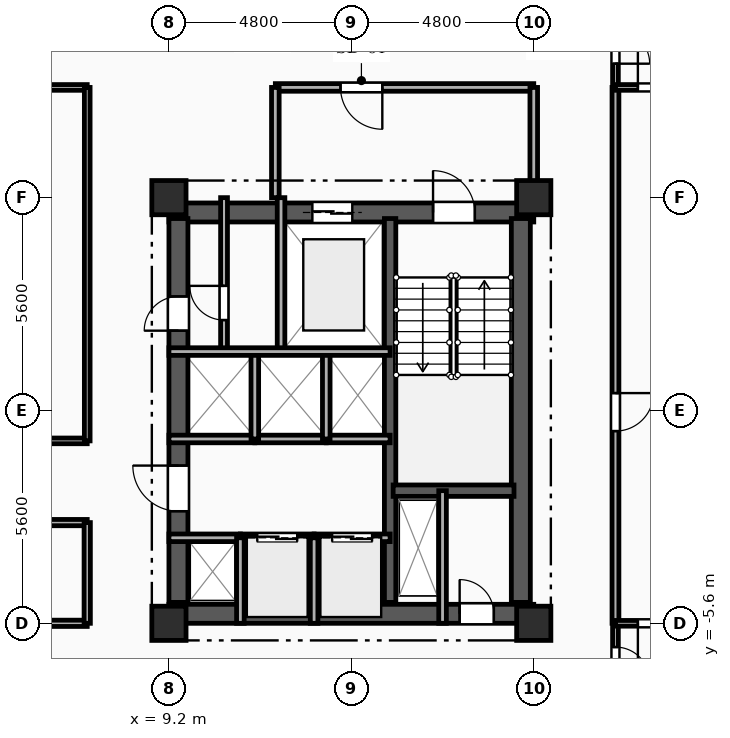
"""IFC4 building model, lengths in metres.
Left out: names, types, materials, properties, quantities, classifications, styles, units other than length and angle.
Written with IfcOpenShell. Run it as: python <this file> out.ifc"""

import sys

from ifc_helpers import new_model, si_unit, direction, frame, frame_2d, origin, origin_2d, place, context, subcontext, project, spatial, rectangle, extrude, element, fill, save


model = new_model("IFC4")
c1 = context("Model", 3, precision=1e-05, world=origin(), true_north=direction((0.0, 1.0)))
c2 = subcontext(c1, "Body", "Model", "MODEL_VIEW")
j1 = project(units=[si_unit("LENGTHUNIT", "METRE"), si_unit("PLANEANGLEUNIT", "RADIAN")], contexts=[c1])
p1 = place(None, origin())
s1 = spatial("IfcSite", under=j1, at=p1, CompositionType="ELEMENT")
p2 = place(p1, origin())
s2 = spatial("IfcBuilding", under=s1, at=p2, CompositionType="ELEMENT")
p3 = place(p2, frame((0.0, 0.0, 161.15)))
s3 = spatial("IfcBuildingStorey", under=s2, at=p3, CompositionType="ELEMENT", Elevation=161.15)
for number, where, z_axis, x_axis in (
    (1, (9.2, -5.6, 0.0), (0.0, 0.0, 1.0), (1.0, 0.0, 0.0)),
    (2, (9.2, 5.6, 0.0), (0.0, 0.0, 1.0), (1.0, 0.0, 0.0)),
    (3, (18.8, -5.6, 0.0), (0.0, 0.0, 1.0), (1.0, 0.0, 0.0)),
    (4, (18.8, 5.6, 0.0), (0.0, 0.0, 1.0), (1.0, 0.0, 0.0)),
):
    element("IfcColumn", number, at=place(p3, frame(where, z_axis=z_axis, x_axis=x_axis)), inside=s3, PredefinedType="COLUMN", context=c2, shape_type="SweptSolid", body=[
        extrude(rectangle(XDim=0.9, YDim=0.9, at=origin_2d()), origin(), (0.0, 0.0, 1.0), 3.35),
    ])
p4 = place(p3, frame((9.2, 5.21, 0.0), z_axis=(0.0, 0.0, 1.0), x_axis=(1.0, 0.0, 0.0)))
e5 = element("IfcWall", 5, at=p4, inside=s3, PredefinedType="SHEAR", context=c2, shape_type="SweptSolid", body=[
    extrude(rectangle(XDim=9.6, YDim=0.5, at=frame_2d((4.8, 0.0))), origin(), (0.0, 0.0, 1.0), 3.04),
])
p5 = place(p4, frame((6.95, 0.0, 0.0)))
e6 = element("IfcOpeningElement", 6, at=p5, cuts=e5, PredefinedType="OPENING", context=c2, shape_type="SweptSolid", body=[
    extrude(rectangle(XDim=1.1, YDim=2.15, at=frame_2d((0.55, 1.075))), frame((0.0, 0.26, 0.0), z_axis=(0.0, -1.0, 0.0), x_axis=(1.0, 0.0, 0.0)), (0.0, 0.0, 1.0), 0.52),
])
p6 = place(p4, frame((3.775, 0.0, 0.0)))
e7 = element("IfcOpeningElement", 7, at=p6, cuts=e5, PredefinedType="OPENING", context=c2, shape_type="SweptSolid", body=[
    extrude(rectangle(XDim=1.05, YDim=2.1, at=frame_2d((0.525, 1.05))), frame((0.0, 0.26, 0.0), z_axis=(0.0, -1.0, 0.0), x_axis=(1.0, 0.0, 0.0)), (0.0, 0.0, 1.0), 0.52),
])
p7 = place(p3, frame((9.2, -5.35, 0.0), z_axis=(0.0, 0.0, 1.0), x_axis=(1.0, 0.0, 0.0)))
e8 = element("IfcWall", 8, at=p7, inside=s3, PredefinedType="SHEAR", context=c2, shape_type="SweptSolid", body=[
    extrude(rectangle(XDim=9.6, YDim=0.5, at=frame_2d((4.8, 0.0))), origin(), (0.0, 0.0, 1.0), 3.04),
])
p8 = place(p7, frame((7.65, 0.0, 0.0)))
e9 = element("IfcOpeningElement", 9, at=p8, cuts=e8, PredefinedType="OPENING", context=c2, shape_type="SweptSolid", body=[
    extrude(rectangle(XDim=0.9, YDim=2.1, at=frame_2d((0.45, 1.05))), frame((0.0, 0.26, 0.0), z_axis=(0.0, -1.0, 0.0), x_axis=(1.0, 0.0, 0.0)), (0.0, 0.0, 1.0), 0.52),
])
p9 = place(p3, frame((9.45, -5.05, 0.0), z_axis=(0.0, 0.0, 1.0), x_axis=(0.0, 1.0, 0.0)))
e10 = element("IfcWall", 10, at=p9, inside=s3, PredefinedType="SHEAR", context=c2, shape_type="SweptSolid", body=[
    extrude(rectangle(XDim=10.1, YDim=0.5, at=frame_2d((5.05, 0.0))), origin(), (0.0, 0.0, 1.0), 3.04),
])
p10 = place(p9, frame((7.15, 0.0, 0.0)))
e11 = element("IfcOpeningElement", 11, at=p10, cuts=e10, PredefinedType="OPENING", context=c2, shape_type="SweptSolid", body=[
    extrude(rectangle(XDim=0.9, YDim=2.1, at=frame_2d((0.45, 1.05))), frame((0.0, 0.26, 0.0), z_axis=(0.0, -1.0, 0.0), x_axis=(1.0, 0.0, 0.0)), (0.0, 0.0, 1.0), 0.52),
])
p11 = place(p9, frame((2.4, 0.0, 0.0)))
e12 = element("IfcOpeningElement", 12, at=p11, cuts=e10, PredefinedType="OPENING", context=c2, shape_type="SweptSolid", body=[
    extrude(rectangle(XDim=1.2, YDim=2.15, at=frame_2d((0.6, 1.075))), frame((0.0, 0.26, 0.0), z_axis=(0.0, -1.0, 0.0), x_axis=(1.0, 0.0, 0.0)), (0.0, 0.0, 1.0), 0.52),
])
p12 = place(p3, frame((18.46, -5.05, 0.0), z_axis=(0.0, 0.0, 1.0), x_axis=(0.0, 1.0, 0.0)))
e13 = element("IfcWall", 13, at=p12, inside=s3, PredefinedType="SHEAR", context=c2, shape_type="SweptSolid", body=[
    extrude(rectangle(XDim=10.1, YDim=0.5, at=frame_2d((5.05, 0.0))), origin(), (0.0, 0.0, 1.0), 3.04),
])
p13 = place(p3, frame((15.02, -5.05, 0.0), z_axis=(0.0, 0.0, 1.0), x_axis=(0.0, 1.0, 0.0)))
e14 = element("IfcWall", 14, at=p13, inside=s3, PredefinedType="SHEAR", context=c2, shape_type="SweptSolid", body=[
    extrude(rectangle(XDim=10.1, YDim=0.3, at=frame_2d((5.05, 0.0))), origin(), (0.0, 0.0, 1.0), 3.04),
])
p14 = place(p3, frame((15.1, -2.11, 0.0), z_axis=(0.0, 0.0, 1.0), x_axis=(1.0, 0.0, 0.0)))
e15 = element("IfcWall", 15, at=p14, inside=s3, PredefinedType="SHEAR", context=c2, shape_type="SweptSolid", body=[
    extrude(rectangle(XDim=3.18, YDim=0.3, at=frame_2d((1.59, 0.0))), origin(), (0.0, 0.0, 1.0), 3.04),
])
p15 = place(p3, frame((16.4, -2.11, 0.0), z_axis=(0.0, 0.0, 1.0), x_axis=(0.0, -1.0, 0.0)))
e16 = element("IfcWall", 16, at=p15, inside=s3, PredefinedType="PARTITIONING", context=c2, shape_type="SweptSolid", body=[
    extrude(rectangle(XDim=3.49, YDim=0.2, at=frame_2d((1.745, 0.0))), origin(), (0.0, 0.0, 1.0), 3.04),
])
p16 = place(p3, frame((12.15, 5.6, 0.0), z_axis=(0.0, 0.0, 1.0), x_axis=(0.0, -1.0, 0.0)))
e17 = element("IfcWall", 17, at=p16, inside=s3, PredefinedType="PARTITIONING", context=c2, shape_type="SweptSolid", body=[
    extrude(rectangle(XDim=4.05, YDim=0.2, at=frame_2d((2.025, 0.0))), origin(), (0.0, 0.0, 1.0), 3.04),
])
p17 = place(p3, frame((18.8, 8.5, 0.0), z_axis=(0.0, 0.0, 1.0), x_axis=(-1.0, 0.0, 0.0)))
e18 = element("IfcWall", 18, at=p17, inside=s3, PredefinedType="PARTITIONING", context=c2, shape_type="SweptSolid", body=[
    extrude(rectangle(XDim=6.8, YDim=0.2, at=frame_2d((3.4, 0.0))), origin(), (0.0, 0.0, 1.0), 3.04),
])
p18 = place(p17, frame((3.985, 0.0, 0.0)))
e19 = element("IfcOpeningElement", 19, at=p18, cuts=e18, PredefinedType="OPENING", context=c2, shape_type="SweptSolid", body=[
    extrude(rectangle(XDim=1.1, YDim=2.15, at=frame_2d((0.55, 1.075))), frame((0.0, 0.11, 0.0), z_axis=(0.0, -1.0, 0.0), x_axis=(1.0, 0.0, 0.0)), (0.0, 0.0, 1.0), 0.22),
])
p19 = place(p3, frame((18.8, 5.6, 0.0), z_axis=(0.0, 0.0, 1.0), x_axis=(0.0, 1.0, 0.0)))
e20 = element("IfcWall", 20, at=p19, inside=s3, PredefinedType="PARTITIONING", context=c2, shape_type="SweptSolid", body=[
    extrude(rectangle(XDim=2.9, YDim=0.2, at=frame_2d((1.45, 0.0))), origin(), (0.0, 0.0, 1.0), 2.525),
])
p20 = place(p3, frame((12.0, 8.5, 0.0), z_axis=(0.0, 0.0, 1.0), x_axis=(0.0, -1.0, 0.0)))
e21 = element("IfcWall", 21, at=p20, inside=s3, PredefinedType="PARTITIONING", context=c2, shape_type="SweptSolid", body=[
    extrude(rectangle(XDim=2.9, YDim=0.2, at=frame_2d((1.45, 0.0))), origin(), (0.0, 0.0, 1.0), 3.04),
])
p21 = place(p3, frame((10.65, 1.55, 0.0), z_axis=(0.0, 0.0, 1.0), x_axis=(0.0, 1.0, 0.0)))
e22 = element("IfcWall", 22, at=p21, inside=s3, PredefinedType="PARTITIONING", context=c2, shape_type="SweptSolid", body=[
    extrude(rectangle(XDim=4.05, YDim=0.18, at=frame_2d((2.025, 0.0))), origin(), (0.0, 0.0, 1.0), 3.04),
])
p22 = place(p21, frame((0.829, 0.0, 0.0)))
e23 = element("IfcOpeningElement", 23, at=p22, cuts=e22, PredefinedType="OPENING", context=c2, shape_type="SweptSolid", body=[
    extrude(rectangle(XDim=0.9, YDim=2.1, at=frame_2d((0.45, 1.05))), frame((0.0, 0.1, 0.0), z_axis=(0.0, -1.0, 0.0), x_axis=(1.0, 0.0, 0.0)), (0.0, 0.0, 1.0), 0.2),
])
p23 = place(p3, frame((9.2, -3.35, 0.0), z_axis=(0.0, 0.0, 1.0), x_axis=(1.0, 0.0, 0.0)))
e24 = element("IfcWall", 24, at=p23, inside=s3, PredefinedType="PARTITIONING", context=c2, shape_type="SweptSolid", body=[
    extrude(rectangle(XDim=1.88, YDim=0.2, at=frame_2d((0.94, 0.0))), origin(), (0.0, 0.0, 1.0), 2.755),
])
p24 = place(p3, frame((11.08, -3.35, 0.0), z_axis=(0.0, 0.0, 1.0), x_axis=(1.0, 0.0, 0.0)))
e25 = element("IfcWall", 25, at=p24, inside=s3, PredefinedType="PARTITIONING", context=c2, shape_type="SweptSolid", body=[
    extrude(rectangle(XDim=1.94, YDim=0.2, at=frame_2d((0.97, 0.0))), origin(), (0.0, 0.0, 1.0), 3.04),
])
p25 = place(p24, frame((0.445, 0.0, 0.0)))
e26 = element("IfcOpeningElement", 26, at=p25, cuts=e25, PredefinedType="OPENING", context=c2, shape_type="SweptSolid", body=[
    extrude(rectangle(XDim=1.05, YDim=2.1, at=frame_2d((0.525, 1.05))), frame((0.0, 0.11, 0.0), z_axis=(0.0, -1.0, 0.0), x_axis=(1.0, 0.0, 0.0)), (0.0, 0.0, 1.0), 0.22),
])
p26 = place(p3, frame((13.02, -3.35, 0.0), z_axis=(0.0, 0.0, 1.0), x_axis=(1.0, 0.0, 0.0)))
e27 = element("IfcWall", 27, at=p26, inside=s3, PredefinedType="PARTITIONING", context=c2, shape_type="SweptSolid", body=[
    extrude(rectangle(XDim=2.0, YDim=0.2, at=frame_2d((1.0, 0.0))), origin(), (0.0, 0.0, 1.0), 3.04),
])
p27 = place(p26, frame((0.475, 0.0, 0.0)))
e28 = element("IfcOpeningElement", 28, at=p27, cuts=e27, PredefinedType="OPENING", context=c2, shape_type="SweptSolid", body=[
    extrude(rectangle(XDim=1.05, YDim=2.1, at=frame_2d((0.525, 1.05))), frame((0.0, 0.11, 0.0), z_axis=(0.0, -1.0, 0.0), x_axis=(1.0, 0.0, 0.0)), (0.0, 0.0, 1.0), 0.22),
])
p28 = place(p3, frame((11.46, -0.75, 0.0), z_axis=(0.0, 0.0, 1.0), x_axis=(-1.0, 0.0, 0.0)))
e29 = element("IfcWall", 29, at=p28, inside=s3, PredefinedType="PARTITIONING", context=c2, shape_type="SweptSolid", body=[
    extrude(rectangle(XDim=2.26, YDim=0.2, at=frame_2d((1.13, 0.0))), origin(), (0.0, 0.0, 1.0), 3.04),
])
p29 = place(p3, frame((13.34, -0.75, 0.0), z_axis=(0.0, 0.0, 1.0), x_axis=(-1.0, 0.0, 0.0)))
e30 = element("IfcWall", 30, at=p29, inside=s3, PredefinedType="PARTITIONING", context=c2, shape_type="SweptSolid", body=[
    extrude(rectangle(XDim=1.88, YDim=0.2, at=frame_2d((0.94, 0.0))), origin(), (0.0, 0.0, 1.0), 3.04),
])
p30 = place(p3, frame((15.02, -0.75, 0.0), z_axis=(0.0, 0.0, 1.0), x_axis=(-1.0, 0.0, 0.0)))
e31 = element("IfcWall", 31, at=p30, inside=s3, PredefinedType="PARTITIONING", context=c2, shape_type="SweptSolid", body=[
    extrude(rectangle(XDim=1.68, YDim=0.2, at=frame_2d((0.84, 0.0))), origin(), (0.0, 0.0, 1.0), 3.04),
])
for number, where, z_axis, x_axis in (
    (32, (11.08, -5.6, 0.0), (0.0, 0.0, 1.0), (0.0, 1.0, 0.0)),
    (33, (13.02, -5.6, 0.0), (0.0, 0.0, 1.0), (0.0, 1.0, 0.0)),
):
    element("IfcWall", number, at=place(p3, frame(where, z_axis=z_axis, x_axis=x_axis)), inside=s3, PredefinedType="PARTITIONING", context=c2, shape_type="SweptSolid", body=[
        extrude(rectangle(XDim=2.25, YDim=0.2, at=frame_2d((1.125, 0.0))), origin(), (0.0, 0.0, 1.0), 3.04),
    ])
for number, where, z_axis, x_axis in (
    (34, (11.46, -0.75, 0.0), (0.0, 0.0, 1.0), (0.0, 1.0, 0.0)),
    (35, (13.34, -0.75, 0.0), (0.0, 0.0, 1.0), (0.0, 1.0, 0.0)),
):
    element("IfcWall", number, at=place(p3, frame(where, z_axis=z_axis, x_axis=x_axis)), inside=s3, PredefinedType="PARTITIONING", context=c2, shape_type="SweptSolid", body=[
        extrude(rectangle(XDim=2.3, YDim=0.2, at=frame_2d((1.15, 0.0))), origin(), (0.0, 0.0, 1.0), 3.04),
    ])
p31 = place(p3, frame((20.95, 10.65, 0.0), z_axis=(0.0, 0.0, 1.0), x_axis=(0.0, -1.0, 0.0)))
e36 = element("IfcWall", 36, at=p31, inside=s3, PredefinedType="PARTITIONING", context=c2, shape_type="SweptSolid", body=[
    extrude(rectangle(XDim=2.15, YDim=0.15, at=frame_2d((1.075, 0.0))), origin(), (0.0, 0.0, 1.0), 3.04),
])
p32 = place(p31, frame((0.625, 0.0, 0.0)))
e37 = element("IfcOpeningElement", 37, at=p32, cuts=e36, PredefinedType="OPENING", context=c2, shape_type="SweptSolid", body=[
    extrude(rectangle(XDim=0.9, YDim=2.1, at=frame_2d((0.45, 1.05))), frame((0.0, 0.085, 0.0), z_axis=(0.0, -1.0, 0.0), x_axis=(1.0, 0.0, 0.0)), (0.0, 0.0, 1.0), 0.17),
])
p33 = place(p3, frame((7.05, 8.5, 0.0), z_axis=(0.0, 0.0, 1.0), x_axis=(-1.0, 0.0, 0.0)))
e38 = element("IfcWall", 38, at=p33, inside=s3, PredefinedType="PARTITIONING", context=c2, shape_type="SweptSolid", body=[
    extrude(rectangle(XDim=7.05, YDim=0.15, at=frame_2d((3.525, 0.0))), origin(), (0.0, 0.0, 1.0), 3.04),
])
p34 = place(p3, frame((20.95, -5.6, 0.0), z_axis=(0.0, 0.0, 1.0), x_axis=(0.0, -1.0, 0.0)))
e39 = element("IfcWall", 39, at=p34, inside=s3, PredefinedType="PARTITIONING", context=c2, shape_type="SweptSolid", body=[
    extrude(rectangle(XDim=2.15, YDim=0.15, at=frame_2d((1.075, 0.0))), origin(), (0.0, 0.0, 1.0), 3.04),
])
p35 = place(p34, frame((0.625, 0.0, 0.0)))
e40 = element("IfcOpeningElement", 40, at=p35, cuts=e39, PredefinedType="OPENING", context=c2, shape_type="SweptSolid", body=[
    extrude(rectangle(XDim=0.9, YDim=2.1, at=frame_2d((0.45, 1.05))), frame((0.0, 0.085, 0.0), z_axis=(0.0, -1.0, 0.0), x_axis=(1.0, 0.0, 0.0)), (0.0, 0.0, 1.0), 0.17),
])
p36 = place(p3, frame((0.0, -5.6, 0.0), z_axis=(0.0, 0.0, 1.0), x_axis=(1.0, 0.0, 0.0)))
e41 = element("IfcWall", 41, at=p36, inside=s3, PredefinedType="PARTITIONING", context=c2, shape_type="SweptSolid", body=[
    extrude(rectangle(XDim=7.05, YDim=0.165, at=frame_2d((3.525, 0.0))), origin(), (0.0, 0.0, 1.0), 2.525),
])
p37 = place(p3, frame((20.95, 8.5, 0.0), z_axis=(0.0, 0.0, 1.0), x_axis=(0.0, -1.0, 0.0)))
e42 = element("IfcWall", 42, at=p37, inside=s3, PredefinedType="PARTITIONING", context=c2, shape_type="SweptSolid", body=[
    extrude(rectangle(XDim=14.1, YDim=0.18, at=frame_2d((7.05, 0.0))), origin(), (0.0, 0.0, 1.0), 3.04),
])
p38 = place(p37, frame((8.042, 0.0, 0.0)))
e43 = element("IfcOpeningElement", 43, at=p38, cuts=e42, PredefinedType="OPENING", context=c2, shape_type="SweptSolid", body=[
    extrude(rectangle(XDim=1.0, YDim=2.15, at=frame_2d((0.5, 1.075))), frame((0.0, 0.1, 0.0), z_axis=(0.0, -1.0, 0.0), x_axis=(1.0, 0.0, 0.0)), (0.0, 0.0, 1.0), 0.2),
])
p39 = place(p3, frame((-7.05, -0.8, 0.0), z_axis=(0.0, 0.0, 1.0), x_axis=(1.0, 0.0, 0.0)))
e44 = element("IfcWall", 44, at=p39, inside=s3, PredefinedType="PARTITIONING", context=c2, shape_type="SweptSolid", body=[
    extrude(rectangle(XDim=14.1, YDim=0.15, at=frame_2d((7.05, 0.0))), origin(), (0.0, 0.0, 1.0), 3.04),
])
p40 = place(p39, frame((6.525, 0.0, 0.0)))
e45 = element("IfcOpeningElement", 45, at=p40, cuts=e44, PredefinedType="OPENING", context=c2, shape_type="SweptSolid", body=[
    extrude(rectangle(XDim=1.05, YDim=2.15, at=frame_2d((0.525, 1.075))), frame((0.0, 0.085, 0.0), z_axis=(0.0, -1.0, 0.0), x_axis=(1.0, 0.0, 0.0)), (0.0, 0.0, 1.0), 0.17),
])
p41 = place(p3, frame((7.05, -2.95, 0.0), z_axis=(0.0, 0.0, 1.0), x_axis=(-1.0, 0.0, 0.0)))
e46 = element("IfcWall", 46, at=p41, inside=s3, PredefinedType="PARTITIONING", context=c2, shape_type="SweptSolid", body=[
    extrude(rectangle(XDim=14.1, YDim=0.165, at=frame_2d((7.05, 0.0))), origin(), (0.0, 0.0, 1.0), 3.04),
])
p42 = place(p41, frame((6.475, 0.0, 0.0)))
e47 = element("IfcOpeningElement", 47, at=p42, cuts=e46, PredefinedType="OPENING", context=c2, shape_type="SweptSolid", body=[
    extrude(rectangle(XDim=1.15, YDim=2.15, at=frame_2d((0.575, 1.075))), frame((0.0, 0.093, 0.0), z_axis=(0.0, -1.0, 0.0), x_axis=(1.0, 0.0, 0.0)), (0.0, 0.0, 1.0), 0.185),
])
p43 = place(p3, frame((7.05, -0.8, 0.0), z_axis=(0.0, 0.0, 1.0), x_axis=(0.0, 1.0, 0.0)))
e48 = element("IfcWall", 48, at=p43, inside=s3, PredefinedType="PARTITIONING", context=c2, shape_type="SweptSolid", body=[
    extrude(rectangle(XDim=9.3, YDim=0.15, at=frame_2d((4.65, 0.0))), origin(), (0.0, 0.0, 1.0), 3.04),
])
p44 = place(p3, frame((7.05, -5.6, 0.0), z_axis=(0.0, 0.0, 1.0), x_axis=(0.0, 1.0, 0.0)))
e49 = element("IfcWall", 49, at=p44, inside=s3, PredefinedType="PARTITIONING", context=c2, shape_type="SweptSolid", body=[
    extrude(rectangle(XDim=2.65, YDim=0.165, at=frame_2d((1.325, 0.0))), origin(), (0.0, 0.0, 1.0), 3.04),
])
p45 = place(p3, frame((20.95, 8.5, 0.0), z_axis=(0.0, 0.0, 1.0), x_axis=(1.0, 0.0, 0.0)))
e50 = element("IfcWall", 50, at=p45, inside=s3, PredefinedType="PARTITIONING", context=c2, shape_type="SweptSolid", body=[
    extrude(rectangle(XDim=2.23, YDim=0.15, at=frame_2d((1.115, 0.0))), origin(), (0.0, 0.0, 1.0), 3.04),
])
p46 = place(p45, frame((0.59, 0.0, 0.0)))
e51 = element("IfcOpeningElement", 51, at=p46, cuts=e50, PredefinedType="OPENING", context=c2, shape_type="SweptSolid", body=[
    extrude(rectangle(XDim=1.05, YDim=2.15, at=frame_2d((0.525, 1.075))), frame((0.0, 0.085, 0.0), z_axis=(0.0, -1.0, 0.0), x_axis=(1.0, 0.0, 0.0)), (0.0, 0.0, 1.0), 0.17),
])
p47 = place(p3, frame((23.18, -5.6, 0.0), z_axis=(0.0, 0.0, 1.0), x_axis=(-1.0, 0.0, 0.0)))
e52 = element("IfcWall", 52, at=p47, inside=s3, PredefinedType="PARTITIONING", context=c2, shape_type="SweptSolid", body=[
    extrude(rectangle(XDim=2.23, YDim=0.15, at=frame_2d((1.115, 0.0))), origin(), (0.0, 0.0, 1.0), 3.04),
])
p48 = place(p47, frame((0.59, 0.0, 0.0)))
e53 = element("IfcOpeningElement", 53, at=p48, cuts=e52, PredefinedType="OPENING", context=c2, shape_type="SweptSolid", body=[
    extrude(rectangle(XDim=1.05, YDim=2.15, at=frame_2d((0.525, 1.075))), frame((0.0, 0.085, 0.0), z_axis=(0.0, -1.0, 0.0), x_axis=(1.0, 0.0, 0.0)), (0.0, 0.0, 1.0), 0.17),
])
p49 = place(p3, frame((9.2, 1.55, 0.0), z_axis=(0.0, 0.0, 1.0), x_axis=(1.0, 0.0, 0.0)))
e54 = element("IfcWall", 54, at=p49, inside=s3, PredefinedType="PARTITIONING", context=c2, shape_type="SweptSolid", body=[
    extrude(rectangle(XDim=5.82, YDim=0.2, at=frame_2d((2.91, 0.0))), origin(), (0.0, 0.0, 1.0), 3.04),
])
p50 = place(p5, origin())
e55 = element("IfcDoor", 55, at=p50, inside=s3, OperationType="SINGLE_SWING_LEFT", PredefinedType="DOOR", context=c2, shape_type="SweptSolid", body=[
    extrude(rectangle(XDim=1.1, YDim=2.15, at=frame_2d((0.55, 1.075))), frame((0.0, 0.025, 0.0), z_axis=(0.0, -1.0, 0.0), x_axis=(1.0, 0.0, 0.0)), (0.0, 0.0, 1.0), 0.05),
])
fill(e6, e55)
p51 = place(p6, origin())
e56 = element("IfcDoor", 56, at=p51, inside=s3, OperationType="DOUBLE_DOOR_SLIDING", PredefinedType="DOOR", context=c2, shape_type="SweptSolid", body=[
    extrude(rectangle(XDim=1.05, YDim=2.1, at=frame_2d((0.525, 1.05))), frame((0.0, 0.025, 0.0), z_axis=(0.0, -1.0, 0.0), x_axis=(1.0, 0.0, 0.0)), (0.0, 0.0, 1.0), 0.05),
])
fill(e7, e56)
p52 = place(p8, origin())
e57 = element("IfcDoor", 57, at=p52, inside=s3, OperationType="SINGLE_SWING_LEFT", PredefinedType="DOOR", context=c2, shape_type="SweptSolid", body=[
    extrude(rectangle(XDim=0.9, YDim=2.1, at=frame_2d((0.45, 1.05))), frame((0.0, 0.025, 0.0), z_axis=(0.0, -1.0, 0.0), x_axis=(1.0, 0.0, 0.0)), (0.0, 0.0, 1.0), 0.05),
])
fill(e9, e57)
p53 = place(p18, origin())
e58 = element("IfcDoor", 58, at=p53, inside=s3, OperationType="SINGLE_SWING_LEFT", PredefinedType="DOOR", context=c2, shape_type="SweptSolid", body=[
    extrude(rectangle(XDim=1.1, YDim=2.15, at=frame_2d((0.55, 1.075))), frame((0.0, 0.025, 0.0), z_axis=(0.0, -1.0, 0.0), x_axis=(1.0, 0.0, 0.0)), (0.0, 0.0, 1.0), 0.05),
])
fill(e19, e58)
p54 = place(p22, origin())
e59 = element("IfcDoor", 59, at=p54, inside=s3, OperationType="SINGLE_SWING_RIGHT", PredefinedType="DOOR", context=c2, shape_type="SweptSolid", body=[
    extrude(rectangle(XDim=0.9, YDim=2.1, at=frame_2d((0.45, 1.05))), frame((0.0, 0.025, 0.0), z_axis=(0.0, -1.0, 0.0), x_axis=(1.0, 0.0, 0.0)), (0.0, 0.0, 1.0), 0.05),
])
fill(e23, e59)
p55 = place(p10, origin())
e60 = element("IfcDoor", 60, at=p55, inside=s3, OperationType="SINGLE_SWING_LEFT", PredefinedType="DOOR", context=c2, shape_type="SweptSolid", body=[
    extrude(rectangle(XDim=0.9, YDim=2.1, at=frame_2d((0.45, 1.05))), frame((0.0, 0.025, 0.0), z_axis=(0.0, -1.0, 0.0), x_axis=(1.0, 0.0, 0.0)), (0.0, 0.0, 1.0), 0.05),
])
fill(e11, e60)
p56 = place(p25, origin())
e61 = element("IfcDoor", 61, at=p56, inside=s3, OperationType="DOUBLE_DOOR_SLIDING", PredefinedType="DOOR", context=c2, shape_type="SweptSolid", body=[
    extrude(rectangle(XDim=1.05, YDim=2.1, at=frame_2d((0.525, 1.05))), frame((0.0, 0.025, 0.0), z_axis=(0.0, -1.0, 0.0), x_axis=(1.0, 0.0, 0.0)), (0.0, 0.0, 1.0), 0.05),
])
fill(e26, e61)
p57 = place(p27, origin())
e62 = element("IfcDoor", 62, at=p57, inside=s3, OperationType="DOUBLE_DOOR_SLIDING", PredefinedType="DOOR", context=c2, shape_type="SweptSolid", body=[
    extrude(rectangle(XDim=1.05, YDim=2.1, at=frame_2d((0.525, 1.05))), frame((0.0, 0.025, 0.0), z_axis=(0.0, -1.0, 0.0), x_axis=(1.0, 0.0, 0.0)), (0.0, 0.0, 1.0), 0.05),
])
fill(e28, e62)
p58 = place(p11, origin())
e63 = element("IfcDoor", 63, at=p58, inside=s3, OperationType="SINGLE_SWING_RIGHT", PredefinedType="DOOR", context=c2, shape_type="SweptSolid", body=[
    extrude(rectangle(XDim=1.2, YDim=2.15, at=frame_2d((0.6, 1.075))), frame((0.0, 0.025, 0.0), z_axis=(0.0, -1.0, 0.0), x_axis=(1.0, 0.0, 0.0)), (0.0, 0.0, 1.0), 0.05),
])
fill(e12, e63)
p59 = place(p32, origin())
e64 = element("IfcDoor", 64, at=p59, inside=s3, OperationType="SINGLE_SWING_RIGHT", PredefinedType="DOOR", context=c2, shape_type="SweptSolid", body=[
    extrude(rectangle(XDim=0.9, YDim=2.1, at=frame_2d((0.45, 1.05))), frame((0.0, 0.025, 0.0), z_axis=(0.0, -1.0, 0.0), x_axis=(1.0, 0.0, 0.0)), (0.0, 0.0, 1.0), 0.05),
])
fill(e37, e64)
p60 = place(p35, origin())
e65 = element("IfcDoor", 65, at=p60, inside=s3, OperationType="SINGLE_SWING_RIGHT", PredefinedType="DOOR", context=c2, shape_type="SweptSolid", body=[
    extrude(rectangle(XDim=0.9, YDim=2.1, at=frame_2d((0.45, 1.05))), frame((0.0, 0.025, 0.0), z_axis=(0.0, -1.0, 0.0), x_axis=(1.0, 0.0, 0.0)), (0.0, 0.0, 1.0), 0.05),
])
fill(e40, e65)
p61 = place(p38, origin())
e66 = element("IfcDoor", 66, at=p61, inside=s3, OperationType="SINGLE_SWING_LEFT", PredefinedType="DOOR", context=c2, shape_type="SweptSolid", body=[
    extrude(rectangle(XDim=1.0, YDim=2.15, at=frame_2d((0.5, 1.075))), frame((0.0, 0.025, 0.0), z_axis=(0.0, -1.0, 0.0), x_axis=(1.0, 0.0, 0.0)), (0.0, 0.0, 1.0), 0.05),
])
fill(e43, e66)
p62 = place(p46, origin())
e67 = element("IfcDoor", 67, at=p62, inside=s3, OperationType="SINGLE_SWING_LEFT", PredefinedType="DOOR", context=c2, shape_type="SweptSolid", body=[
    extrude(rectangle(XDim=1.05, YDim=2.15, at=frame_2d((0.525, 1.075))), frame((0.0, 0.025, 0.0), z_axis=(0.0, -1.0, 0.0), x_axis=(1.0, 0.0, 0.0)), (0.0, 0.0, 1.0), 0.05),
])
fill(e51, e67)
p63 = place(p48, origin())
e68 = element("IfcDoor", 68, at=p63, inside=s3, OperationType="SINGLE_SWING_RIGHT", PredefinedType="DOOR", context=c2, shape_type="SweptSolid", body=[
    extrude(rectangle(XDim=1.05, YDim=2.15, at=frame_2d((0.525, 1.075))), frame((0.0, 0.025, 0.0), z_axis=(0.0, -1.0, 0.0), x_axis=(1.0, 0.0, 0.0)), (0.0, 0.0, 1.0), 0.05),
])
fill(e53, e68)
save(model, sys.argv[1])
